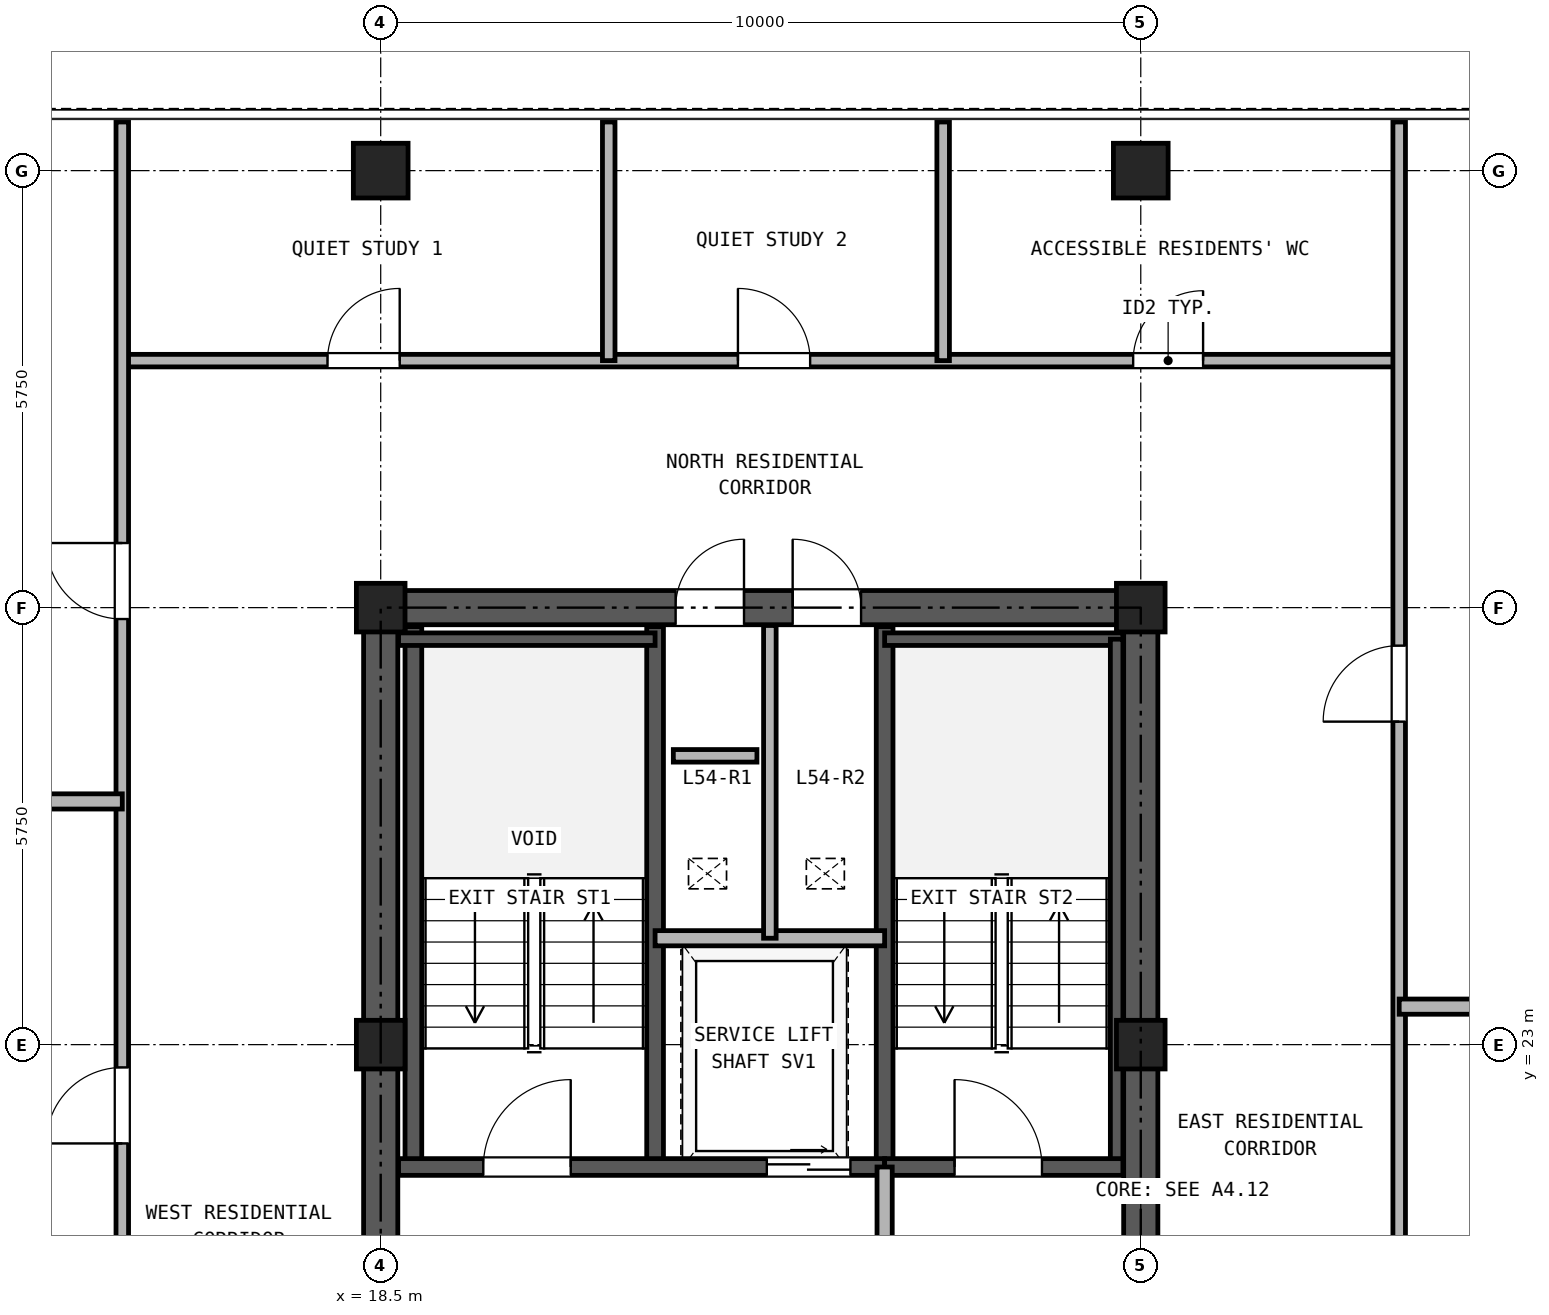
"""IFC4 building model, lengths in metres.
Left out: names, types, materials, properties, quantities, classifications, styles, units other than length and angle.
Written with IfcOpenShell. Run it as: python <this file> out.ifc"""

import sys

from ifc_helpers import new_model, si_unit, direction, frame, frame_2d, origin, origin_2d, place, context, subcontext, project, spatial, rectangle, hollow_rectangle, extrude, source, transform, mapped, element, fill, save


model = new_model("IFC4")
c1 = context("Model", 3, precision=1e-05, world=origin(), true_north=direction((0.0, 1.0)))
c2 = subcontext(c1, "Body", "Model", "MODEL_VIEW")
j1 = project(units=[si_unit("LENGTHUNIT", "METRE"), si_unit("PLANEANGLEUNIT", "RADIAN")], contexts=[c1])
p1 = place(None, origin())
s1 = spatial("IfcSite", under=j1, at=p1, CompositionType="ELEMENT")
p2 = place(p1, origin())
s2 = spatial("IfcBuilding", under=s1, at=p2, CompositionType="ELEMENT")
p3 = place(p2, frame((0.0, 0.0, 193.2)))
s3 = spatial("IfcBuildingStorey", under=s2, at=p3, CompositionType="ELEMENT", Elevation=193.2)
m1 = source(origin(), c2, "Body", "SweptSolid", [
    extrude(hollow_rectangle(XDim=0.72, YDim=0.72, WallThickness=0.04, at=origin_2d()), origin(), (0.0, 0.0, 1.0), 2.95),
])
for number, where, z_axis, x_axis in (
    (1, (18.5, 34.5, 0.0), (0.0, 0.0, 1.0), (1.0, 0.0, 0.0)),
    (2, (28.5, 34.5, 0.0), (0.0, 0.0, 1.0), (1.0, 0.0, 0.0)),
):
    element("IfcColumn", number, at=place(p3, frame(where, z_axis=z_axis, x_axis=x_axis)), inside=s3, PredefinedType="COLUMN", context=c2, shape_type="MappedRepresentation", body=[
        mapped(m1, transform((0.0, 0.0, 0.0), x_axis=(1.0, 0.0, 0.0), y_axis=(0.0, 1.0, 0.0), z_axis=(0.0, 0.0, 1.0), scale=1.0)),
    ])
m2 = source(origin(), c2, "Body", "SweptSolid", [
    extrude(hollow_rectangle(XDim=0.64, YDim=0.64, WallThickness=0.035, at=origin_2d()), origin(), (0.0, 0.0, 1.0), 2.95),
])
for number, where, z_axis, x_axis in (
    (3, (18.5, 23.0, 0.0), (0.0, 0.0, 1.0), (1.0, 0.0, 0.0)),
    (4, (18.5, 28.75, 0.0), (0.0, 0.0, 1.0), (1.0, 0.0, 0.0)),
    (5, (28.5, 23.0, 0.0), (0.0, 0.0, 1.0), (1.0, 0.0, 0.0)),
    (6, (28.5, 28.75, 0.0), (0.0, 0.0, 1.0), (1.0, 0.0, 0.0)),
):
    element("IfcColumn", number, at=place(p3, frame(where, z_axis=z_axis, x_axis=x_axis)), inside=s3, PredefinedType="COLUMN", context=c2, shape_type="MappedRepresentation", body=[
        mapped(m2, transform((0.0, 0.0, 0.0), x_axis=(1.0, 0.0, 0.0), y_axis=(0.0, 1.0, 0.0), z_axis=(0.0, 0.0, 1.0), scale=1.0)),
    ])
p4 = place(p3, frame((18.275, 28.75, 0.0), z_axis=(0.0, 0.0, 1.0), x_axis=(1.0, 0.0, 0.0)))
e7 = element("IfcWall", 7, at=p4, inside=s3, PredefinedType="SHEAR", context=c2, shape_type="SweptSolid", body=[
    extrude(rectangle(XDim=10.45, YDim=0.45, at=frame_2d((5.225, 0.0))), origin(), (0.0, 0.0, 1.0), 2.95),
])
p5 = place(p4, frame((4.105, 0.0, 0.0)))
e8 = element("IfcOpeningElement", 8, at=p5, cuts=e7, PredefinedType="OPENING", context=c2, shape_type="SweptSolid", body=[
    extrude(rectangle(XDim=0.9, YDim=2.05, at=frame_2d((0.45, 1.025))), frame((0.0, 0.235, 0.0), z_axis=(0.0, -1.0, 0.0), x_axis=(1.0, 0.0, 0.0)), (0.0, 0.0, 1.0), 0.47),
])
p6 = place(p4, frame((5.645, 0.0, 0.0)))
e9 = element("IfcOpeningElement", 9, at=p6, cuts=e7, PredefinedType="OPENING", context=c2, shape_type="SweptSolid", body=[
    extrude(rectangle(XDim=0.9, YDim=2.05, at=frame_2d((0.45, 1.025))), frame((0.0, 0.235, 0.0), z_axis=(0.0, -1.0, 0.0), x_axis=(1.0, 0.0, 0.0)), (0.0, 0.0, 1.0), 0.47),
])
p7 = place(p3, frame((18.5, 11.725, 0.0), z_axis=(0.0, 0.0, 1.0), x_axis=(0.0, 1.0, 0.0)))
e10 = element("IfcWall", 10, at=p7, inside=s3, PredefinedType="SHEAR", context=c2, shape_type="SweptSolid", body=[
    extrude(rectangle(XDim=16.8, YDim=0.45, at=frame_2d((8.4, 0.0))), origin(), (0.0, 0.0, 1.0), 2.95),
])
p8 = place(p7, frame((7.425, 0.0, 0.0)))
e11 = element("IfcOpeningElement", 11, at=p8, cuts=e10, PredefinedType="OPENING", context=c2, shape_type="SweptSolid", body=[
    extrude(rectangle(XDim=1.15, YDim=2.2, at=frame_2d((0.575, 1.1))), frame((0.0, 0.235, 0.0), z_axis=(0.0, -1.0, 0.0), x_axis=(1.0, 0.0, 0.0)), (0.0, 0.0, 1.0), 0.47),
])
p9 = place(p3, frame((28.5, 11.725, 0.0), z_axis=(0.0, 0.0, 1.0), x_axis=(0.0, 1.0, 0.0)))
e12 = element("IfcWall", 12, at=p9, inside=s3, PredefinedType="SHEAR", context=c2, shape_type="SweptSolid", body=[
    extrude(rectangle(XDim=16.8, YDim=0.45, at=frame_2d((8.4, 0.0))), origin(), (0.0, 0.0, 1.0), 2.95),
])
p10 = place(p9, frame((7.425, 0.0, 0.0)))
e13 = element("IfcOpeningElement", 13, at=p10, cuts=e12, PredefinedType="OPENING", context=c2, shape_type="SweptSolid", body=[
    extrude(rectangle(XDim=1.15, YDim=2.2, at=frame_2d((0.575, 1.1))), frame((0.0, 0.235, 0.0), z_axis=(0.0, -1.0, 0.0), x_axis=(1.0, 0.0, 0.0)), (0.0, 0.0, 1.0), 0.47),
])
for number, where, z_axis, x_axis in (
    (14, (18.93, 21.39, 0.0), (0.0, 0.0, 1.0), (0.0, 1.0, 0.0)),
    (15, (22.11, 21.39, 0.0), (0.0, 0.0, 1.0), (0.0, 1.0, 0.0)),
    (16, (25.13, 21.39, 0.0), (0.0, 0.0, 1.0), (0.0, 1.0, 0.0)),
):
    element("IfcWall", number, at=place(p3, frame(where, z_axis=z_axis, x_axis=x_axis)), inside=s3, PredefinedType="SOLIDWALL", context=c2, shape_type="SweptSolid", body=[
        extrude(rectangle(XDim=7.11, YDim=0.22, at=frame_2d((3.555, 0.0))), origin(), (0.0, 0.0, 1.0), 2.95),
    ])
p11 = place(p3, frame((18.735, 28.335, 0.0), z_axis=(0.0, 0.0, 1.0), x_axis=(1.0, 0.0, 0.0)))
e17 = element("IfcWall", 17, at=p11, inside=s3, PredefinedType="PARTITIONING", context=c2, shape_type="SweptSolid", body=[
    extrude(rectangle(XDim=3.375, YDim=0.165, at=frame_2d((1.688, 0.0))), origin(), (0.0, 0.0, 1.0), 2.95),
])
p12 = place(p3, frame((25.13, 28.335, 0.0), z_axis=(0.0, 0.0, 1.0), x_axis=(1.0, 0.0, 0.0)))
e18 = element("IfcWall", 18, at=p12, inside=s3, PredefinedType="PARTITIONING", context=c2, shape_type="SweptSolid", body=[
    extrude(rectangle(XDim=3.135, YDim=0.165, at=frame_2d((1.567, 0.0))), origin(), (0.0, 0.0, 1.0), 2.95),
])
p13 = place(p3, frame((28.183, 21.39, 0.0), z_axis=(0.0, 0.0, 1.0), x_axis=(0.0, 1.0, 0.0)))
e19 = element("IfcWall", 19, at=p13, inside=s3, PredefinedType="PARTITIONING", context=c2, shape_type="SweptSolid", body=[
    extrude(rectangle(XDim=6.945, YDim=0.165, at=frame_2d((3.473, 0.0))), origin(), (0.0, 0.0, 1.0), 2.95),
])
p14 = place(p3, frame((18.735, 21.39, 0.0), z_axis=(0.0, 0.0, 1.0), x_axis=(1.0, 0.0, 0.0)))
e20 = element("IfcWall", 20, at=p14, inside=s3, PredefinedType="SOLIDWALL", context=c2, shape_type="SweptSolid", body=[
    extrude(rectangle(XDim=6.395, YDim=0.22, at=frame_2d((3.197, 0.0))), origin(), (0.0, 0.0, 1.0), 2.95),
])
p15 = place(p14, frame((1.115, 0.0, 0.0)))
e21 = element("IfcOpeningElement", 21, at=p15, cuts=e20, PredefinedType="OPENING", context=c2, shape_type="SweptSolid", body=[
    extrude(rectangle(XDim=1.15, YDim=2.2, at=frame_2d((0.575, 1.1))), frame((0.0, 0.12, 0.0), z_axis=(0.0, -1.0, 0.0), x_axis=(1.0, 0.0, 0.0)), (0.0, 0.0, 1.0), 0.24),
])
p16 = place(p14, frame((4.845, 0.0, 0.0)))
e22 = element("IfcOpeningElement", 22, at=p16, cuts=e20, PredefinedType="OPENING", context=c2, shape_type="SweptSolid", body=[
    extrude(rectangle(XDim=1.1, YDim=2.25, at=frame_2d((0.55, 1.125))), frame((0.0, 0.12, 0.0), z_axis=(0.0, -1.0, 0.0), x_axis=(1.0, 0.0, 0.0)), (0.0, 0.0, 1.0), 0.24),
])
p17 = place(p3, frame((25.13, 21.39, 0.0), z_axis=(0.0, 0.0, 1.0), x_axis=(1.0, 0.0, 0.0)))
e23 = element("IfcWall", 23, at=p17, inside=s3, PredefinedType="SOLIDWALL", context=c2, shape_type="SweptSolid", body=[
    extrude(rectangle(XDim=3.135, YDim=0.22, at=frame_2d((1.567, 0.0))), origin(), (0.0, 0.0, 1.0), 2.95),
])
p18 = place(p17, frame((0.92, 0.0, 0.0)))
e24 = element("IfcOpeningElement", 24, at=p18, cuts=e23, PredefinedType="OPENING", context=c2, shape_type="SweptSolid", body=[
    extrude(rectangle(XDim=1.15, YDim=2.2, at=frame_2d((0.575, 1.1))), frame((0.0, 0.12, 0.0), z_axis=(0.0, -1.0, 0.0), x_axis=(1.0, 0.0, 0.0)), (0.0, 0.0, 1.0), 0.24),
])
p19 = place(p3, frame((22.11, 24.4, 0.0), z_axis=(0.0, 0.0, 1.0), x_axis=(1.0, 0.0, 0.0)))
e25 = element("IfcWall", 25, at=p19, inside=s3, PredefinedType="PARTITIONING", context=c2, shape_type="SweptSolid", body=[
    extrude(rectangle(XDim=3.02, YDim=0.2, at=frame_2d((1.51, 0.0))), origin(), (0.0, 0.0, 1.0), 2.95),
])
p20 = place(p3, frame((23.62, 24.4, 0.0), z_axis=(0.0, 0.0, 1.0), x_axis=(0.0, 1.0, 0.0)))
e26 = element("IfcWall", 26, at=p20, inside=s3, PredefinedType="PARTITIONING", context=c2, shape_type="SweptSolid", body=[
    extrude(rectangle(XDim=4.115, YDim=0.165, at=frame_2d((2.058, 0.0))), origin(), (0.0, 0.0, 1.0), 2.95),
])
p21 = place(p3, frame((25.13, 18.0, 0.0), z_axis=(0.0, 0.0, 1.0), x_axis=(0.0, 1.0, 0.0)))
e27 = element("IfcWall", 27, at=p21, inside=s3, PredefinedType="PARTITIONING", context=c2, shape_type="SweptSolid", body=[
    extrude(rectangle(XDim=3.39, YDim=0.2, at=frame_2d((1.695, 0.0))), origin(), (0.0, 0.0, 1.0), 2.95),
])
p22 = place(p21, frame((1.1, 0.0, 0.0)))
e28 = element("IfcOpeningElement", 28, at=p22, cuts=e27, PredefinedType="OPENING", context=c2, shape_type="SweptSolid", body=[
    extrude(rectangle(XDim=1.15, YDim=2.2, at=frame_2d((0.575, 1.1))), frame((0.0, 0.11, 0.0), z_axis=(0.0, -1.0, 0.0), x_axis=(1.0, 0.0, 0.0)), (0.0, 0.0, 1.0), 0.22),
])
p23 = place(p3, frame((15.1, 32.0, 0.0), z_axis=(0.0, 0.0, 1.0), x_axis=(1.0, 0.0, 0.0)))
e29 = element("IfcWall", 29, at=p23, inside=s3, PredefinedType="PARTITIONING", context=c2, shape_type="SweptSolid", body=[
    extrude(rectangle(XDim=16.8, YDim=0.165, at=frame_2d((8.4, 0.0))), origin(), (0.0, 0.0, 1.0), 2.95),
])
p24 = place(p23, frame((2.7, 0.0, 0.0)))
e30 = element("IfcOpeningElement", 30, at=p24, cuts=e29, PredefinedType="OPENING", context=c2, shape_type="SweptSolid", body=[
    extrude(rectangle(XDim=0.95, YDim=2.15, at=frame_2d((0.475, 1.075))), frame((0.0, 0.093, 0.0), z_axis=(0.0, -1.0, 0.0), x_axis=(1.0, 0.0, 0.0)), (0.0, 0.0, 1.0), 0.185),
])
p25 = place(p23, frame((8.1, 0.0, 0.0)))
e31 = element("IfcOpeningElement", 31, at=p25, cuts=e29, PredefinedType="OPENING", context=c2, shape_type="SweptSolid", body=[
    extrude(rectangle(XDim=0.95, YDim=2.15, at=frame_2d((0.475, 1.075))), frame((0.0, 0.093, 0.0), z_axis=(0.0, -1.0, 0.0), x_axis=(1.0, 0.0, 0.0)), (0.0, 0.0, 1.0), 0.185),
])
p26 = place(p23, frame((13.3, 0.0, 0.0)))
e32 = element("IfcOpeningElement", 32, at=p26, cuts=e29, PredefinedType="OPENING", context=c2, shape_type="SweptSolid", body=[
    extrude(rectangle(XDim=0.92, YDim=2.1, at=frame_2d((0.46, 1.05))), frame((0.0, 0.093, 0.0), z_axis=(0.0, -1.0, 0.0), x_axis=(1.0, 0.0, 0.0)), (0.0, 0.0, 1.0), 0.185),
])
p27 = place(p3, frame((15.1, 10.6, 0.0), z_axis=(0.0, 0.0, 1.0), x_axis=(0.0, 1.0, 0.0)))
e33 = element("IfcWall", 33, at=p27, inside=s3, PredefinedType="PARTITIONING", context=c2, shape_type="SweptSolid", body=[
    extrude(rectangle(XDim=24.54, YDim=0.165, at=frame_2d((12.27, 0.0))), origin(), (0.0, 0.0, 1.0), 2.95),
])
p28 = place(p27, frame((3.3, 0.0, 0.0)))
e34 = element("IfcOpeningElement", 34, at=p28, cuts=e33, PredefinedType="OPENING", context=c2, shape_type="SweptSolid", body=[
    extrude(rectangle(XDim=1.0, YDim=2.15, at=frame_2d((0.5, 1.075))), frame((0.0, 0.093, 0.0), z_axis=(0.0, -1.0, 0.0), x_axis=(1.0, 0.0, 0.0)), (0.0, 0.0, 1.0), 0.185),
])
p29 = place(p27, frame((11.1, 0.0, 0.0)))
e35 = element("IfcOpeningElement", 35, at=p29, cuts=e33, PredefinedType="OPENING", context=c2, shape_type="SweptSolid", body=[
    extrude(rectangle(XDim=1.0, YDim=2.15, at=frame_2d((0.5, 1.075))), frame((0.0, 0.093, 0.0), z_axis=(0.0, -1.0, 0.0), x_axis=(1.0, 0.0, 0.0)), (0.0, 0.0, 1.0), 0.185),
])
p30 = place(p27, frame((18.0, 0.0, 0.0)))
e36 = element("IfcOpeningElement", 36, at=p30, cuts=e33, PredefinedType="OPENING", context=c2, shape_type="SweptSolid", body=[
    extrude(rectangle(XDim=1.0, YDim=2.15, at=frame_2d((0.5, 1.075))), frame((0.0, 0.093, 0.0), z_axis=(0.0, -1.0, 0.0), x_axis=(1.0, 0.0, 0.0)), (0.0, 0.0, 1.0), 0.185),
])
p31 = place(p3, frame((31.9, 10.6, 0.0), z_axis=(0.0, 0.0, 1.0), x_axis=(0.0, 1.0, 0.0)))
e37 = element("IfcWall", 37, at=p31, inside=s3, PredefinedType="PARTITIONING", context=c2, shape_type="SweptSolid", body=[
    extrude(rectangle(XDim=24.54, YDim=0.165, at=frame_2d((12.27, 0.0))), origin(), (0.0, 0.0, 1.0), 2.95),
])
p32 = place(p31, frame((5.95, 0.0, 0.0)))
e38 = element("IfcOpeningElement", 38, at=p32, cuts=e37, PredefinedType="OPENING", context=c2, shape_type="SweptSolid", body=[
    extrude(rectangle(XDim=1.0, YDim=2.15, at=frame_2d((0.5, 1.075))), frame((0.0, 0.093, 0.0), z_axis=(0.0, -1.0, 0.0), x_axis=(1.0, 0.0, 0.0)), (0.0, 0.0, 1.0), 0.185),
])
p33 = place(p31, frame((16.65, 0.0, 0.0)))
e39 = element("IfcOpeningElement", 39, at=p33, cuts=e37, PredefinedType="OPENING", context=c2, shape_type="SweptSolid", body=[
    extrude(rectangle(XDim=1.0, YDim=2.15, at=frame_2d((0.5, 1.075))), frame((0.0, 0.093, 0.0), z_axis=(0.0, -1.0, 0.0), x_axis=(1.0, 0.0, 0.0)), (0.0, 0.0, 1.0), 0.185),
])
p34 = place(p3, frame((0.16, 26.2, 0.0), z_axis=(0.0, 0.0, 1.0), x_axis=(1.0, 0.0, 0.0)))
e40 = element("IfcWall", 40, at=p34, inside=s3, PredefinedType="PARTITIONING", context=c2, shape_type="SweptSolid", body=[
    extrude(rectangle(XDim=14.94, YDim=0.2, at=frame_2d((7.47, 0.0))), origin(), (0.0, 0.0, 1.0), 2.95),
])
p35 = place(p3, frame((31.9, 23.5, 0.0), z_axis=(0.0, 0.0, 1.0), x_axis=(1.0, 0.0, 0.0)))
e41 = element("IfcWall", 41, at=p35, inside=s3, PredefinedType="PARTITIONING", context=c2, shape_type="SweptSolid", body=[
    extrude(rectangle(XDim=9.74, YDim=0.2, at=frame_2d((4.87, 0.0))), origin(), (0.0, 0.0, 1.0), 2.95),
])
for number, where, z_axis, x_axis in (
    (42, (21.5, 32.0, 0.0), (0.0, 0.0, 1.0), (0.0, 1.0, 0.0)),
    (43, (25.9, 32.0, 0.0), (0.0, 0.0, 1.0), (0.0, 1.0, 0.0)),
):
    element("IfcWall", number, at=place(p3, frame(where, z_axis=z_axis, x_axis=x_axis)), inside=s3, PredefinedType="PARTITIONING", context=c2, shape_type="SweptSolid", body=[
        extrude(rectangle(XDim=3.14, YDim=0.165, at=frame_2d((1.57, 0.0))), origin(), (0.0, 0.0, 1.0), 2.95),
    ])
p36 = place(p3, frame((22.35, 26.8, 0.0), z_axis=(0.0, 0.0, 1.0), x_axis=(1.0, 0.0, 0.0)))
e44 = element("IfcWall", 44, at=p36, inside=s3, PredefinedType="PARTITIONING", context=c2, shape_type="SweptSolid", body=[
    extrude(rectangle(XDim=1.1, YDim=0.165, at=frame_2d((0.55, 0.0))), origin(), (0.0, 0.0, 1.0), 2.95),
])
p37 = place(p15, frame((1.15, 0.0, 0.0), z_axis=(0.0, 0.0, 1.0), x_axis=(-1.0, 0.0, 0.0)))
e45 = element("IfcDoor", 45, at=p37, inside=s3, OperationType="SINGLE_SWING_RIGHT", PredefinedType="DOOR", context=c2, shape_type="SweptSolid", body=[
    extrude(rectangle(XDim=1.15, YDim=2.2, at=frame_2d((0.575, 1.1))), frame((0.0, 0.025, 0.0), z_axis=(0.0, -1.0, 0.0), x_axis=(1.0, 0.0, 0.0)), (0.0, 0.0, 1.0), 0.05),
])
fill(e21, e45)
p38 = place(p18, frame((1.15, 0.0, 0.0), z_axis=(0.0, 0.0, 1.0), x_axis=(-1.0, 0.0, 0.0)))
e46 = element("IfcDoor", 46, at=p38, inside=s3, OperationType="SINGLE_SWING_LEFT", PredefinedType="DOOR", context=c2, shape_type="SweptSolid", body=[
    extrude(rectangle(XDim=1.15, YDim=2.2, at=frame_2d((0.575, 1.1))), frame((0.0, 0.025, 0.0), z_axis=(0.0, -1.0, 0.0), x_axis=(1.0, 0.0, 0.0)), (0.0, 0.0, 1.0), 0.05),
])
fill(e24, e46)
p39 = place(p16, frame((1.1, 0.0, 0.0), z_axis=(0.0, 0.0, 1.0), x_axis=(-1.0, 0.0, 0.0)))
e47 = element("IfcDoor", 47, at=p39, inside=s3, OperationType="DOUBLE_DOOR_SLIDING", PredefinedType="DOOR", context=c2, shape_type="SweptSolid", body=[
    extrude(rectangle(XDim=1.1, YDim=2.25, at=frame_2d((0.55, 1.125))), frame((0.0, 0.025, 0.0), z_axis=(0.0, -1.0, 0.0), x_axis=(1.0, 0.0, 0.0)), (0.0, 0.0, 1.0), 0.05),
])
fill(e22, e47)
p40 = place(p5, origin())
e48 = element("IfcDoor", 48, at=p40, inside=s3, OperationType="SINGLE_SWING_RIGHT", PredefinedType="DOOR", context=c2, shape_type="SweptSolid", body=[
    extrude(rectangle(XDim=0.9, YDim=2.05, at=frame_2d((0.45, 1.025))), frame((0.0, 0.025, 0.0), z_axis=(0.0, -1.0, 0.0), x_axis=(1.0, 0.0, 0.0)), (0.0, 0.0, 1.0), 0.05),
])
fill(e8, e48)
p41 = place(p6, origin())
e49 = element("IfcDoor", 49, at=p41, inside=s3, OperationType="SINGLE_SWING_LEFT", PredefinedType="DOOR", context=c2, shape_type="SweptSolid", body=[
    extrude(rectangle(XDim=0.9, YDim=2.05, at=frame_2d((0.45, 1.025))), frame((0.0, 0.025, 0.0), z_axis=(0.0, -1.0, 0.0), x_axis=(1.0, 0.0, 0.0)), (0.0, 0.0, 1.0), 0.05),
])
fill(e9, e49)
p42 = place(p29, origin())
e50 = element("IfcDoor", 50, at=p42, inside=s3, OperationType="SINGLE_SWING_LEFT", PredefinedType="DOOR", context=c2, shape_type="SweptSolid", body=[
    extrude(rectangle(XDim=1.0, YDim=2.15, at=frame_2d((0.5, 1.075))), frame((0.0, 0.025, 0.0), z_axis=(0.0, -1.0, 0.0), x_axis=(1.0, 0.0, 0.0)), (0.0, 0.0, 1.0), 0.05),
])
fill(e35, e50)
p43 = place(p30, origin())
e51 = element("IfcDoor", 51, at=p43, inside=s3, OperationType="SINGLE_SWING_RIGHT", PredefinedType="DOOR", context=c2, shape_type="SweptSolid", body=[
    extrude(rectangle(XDim=1.0, YDim=2.15, at=frame_2d((0.5, 1.075))), frame((0.0, 0.025, 0.0), z_axis=(0.0, -1.0, 0.0), x_axis=(1.0, 0.0, 0.0)), (0.0, 0.0, 1.0), 0.05),
])
fill(e36, e51)
p44 = place(p33, frame((1.0, 0.0, 0.0), z_axis=(0.0, 0.0, 1.0), x_axis=(-1.0, 0.0, 0.0)))
e52 = element("IfcDoor", 52, at=p44, inside=s3, OperationType="SINGLE_SWING_LEFT", PredefinedType="DOOR", context=c2, shape_type="SweptSolid", body=[
    extrude(rectangle(XDim=1.0, YDim=2.15, at=frame_2d((0.5, 1.075))), frame((0.0, 0.025, 0.0), z_axis=(0.0, -1.0, 0.0), x_axis=(1.0, 0.0, 0.0)), (0.0, 0.0, 1.0), 0.05),
])
fill(e39, e52)
p45 = place(p24, origin())
e53 = element("IfcDoor", 53, at=p45, inside=s3, OperationType="SINGLE_SWING_RIGHT", PredefinedType="DOOR", context=c2, shape_type="SweptSolid", body=[
    extrude(rectangle(XDim=0.95, YDim=2.15, at=frame_2d((0.475, 1.075))), frame((0.0, 0.025, 0.0), z_axis=(0.0, -1.0, 0.0), x_axis=(1.0, 0.0, 0.0)), (0.0, 0.0, 1.0), 0.05),
])
fill(e30, e53)
p46 = place(p25, origin())
e54 = element("IfcDoor", 54, at=p46, inside=s3, OperationType="SINGLE_SWING_LEFT", PredefinedType="DOOR", context=c2, shape_type="SweptSolid", body=[
    extrude(rectangle(XDim=0.95, YDim=2.15, at=frame_2d((0.475, 1.075))), frame((0.0, 0.025, 0.0), z_axis=(0.0, -1.0, 0.0), x_axis=(1.0, 0.0, 0.0)), (0.0, 0.0, 1.0), 0.05),
])
fill(e31, e54)
p47 = place(p26, origin())
e55 = element("IfcDoor", 55, at=p47, inside=s3, OperationType="SINGLE_SWING_RIGHT", PredefinedType="DOOR", context=c2, shape_type="SweptSolid", body=[
    extrude(rectangle(XDim=0.92, YDim=2.1, at=frame_2d((0.46, 1.05))), frame((0.0, 0.025, 0.0), z_axis=(0.0, -1.0, 0.0), x_axis=(1.0, 0.0, 0.0)), (0.0, 0.0, 1.0), 0.05),
])
fill(e32, e55)
save(model, sys.argv[1])
